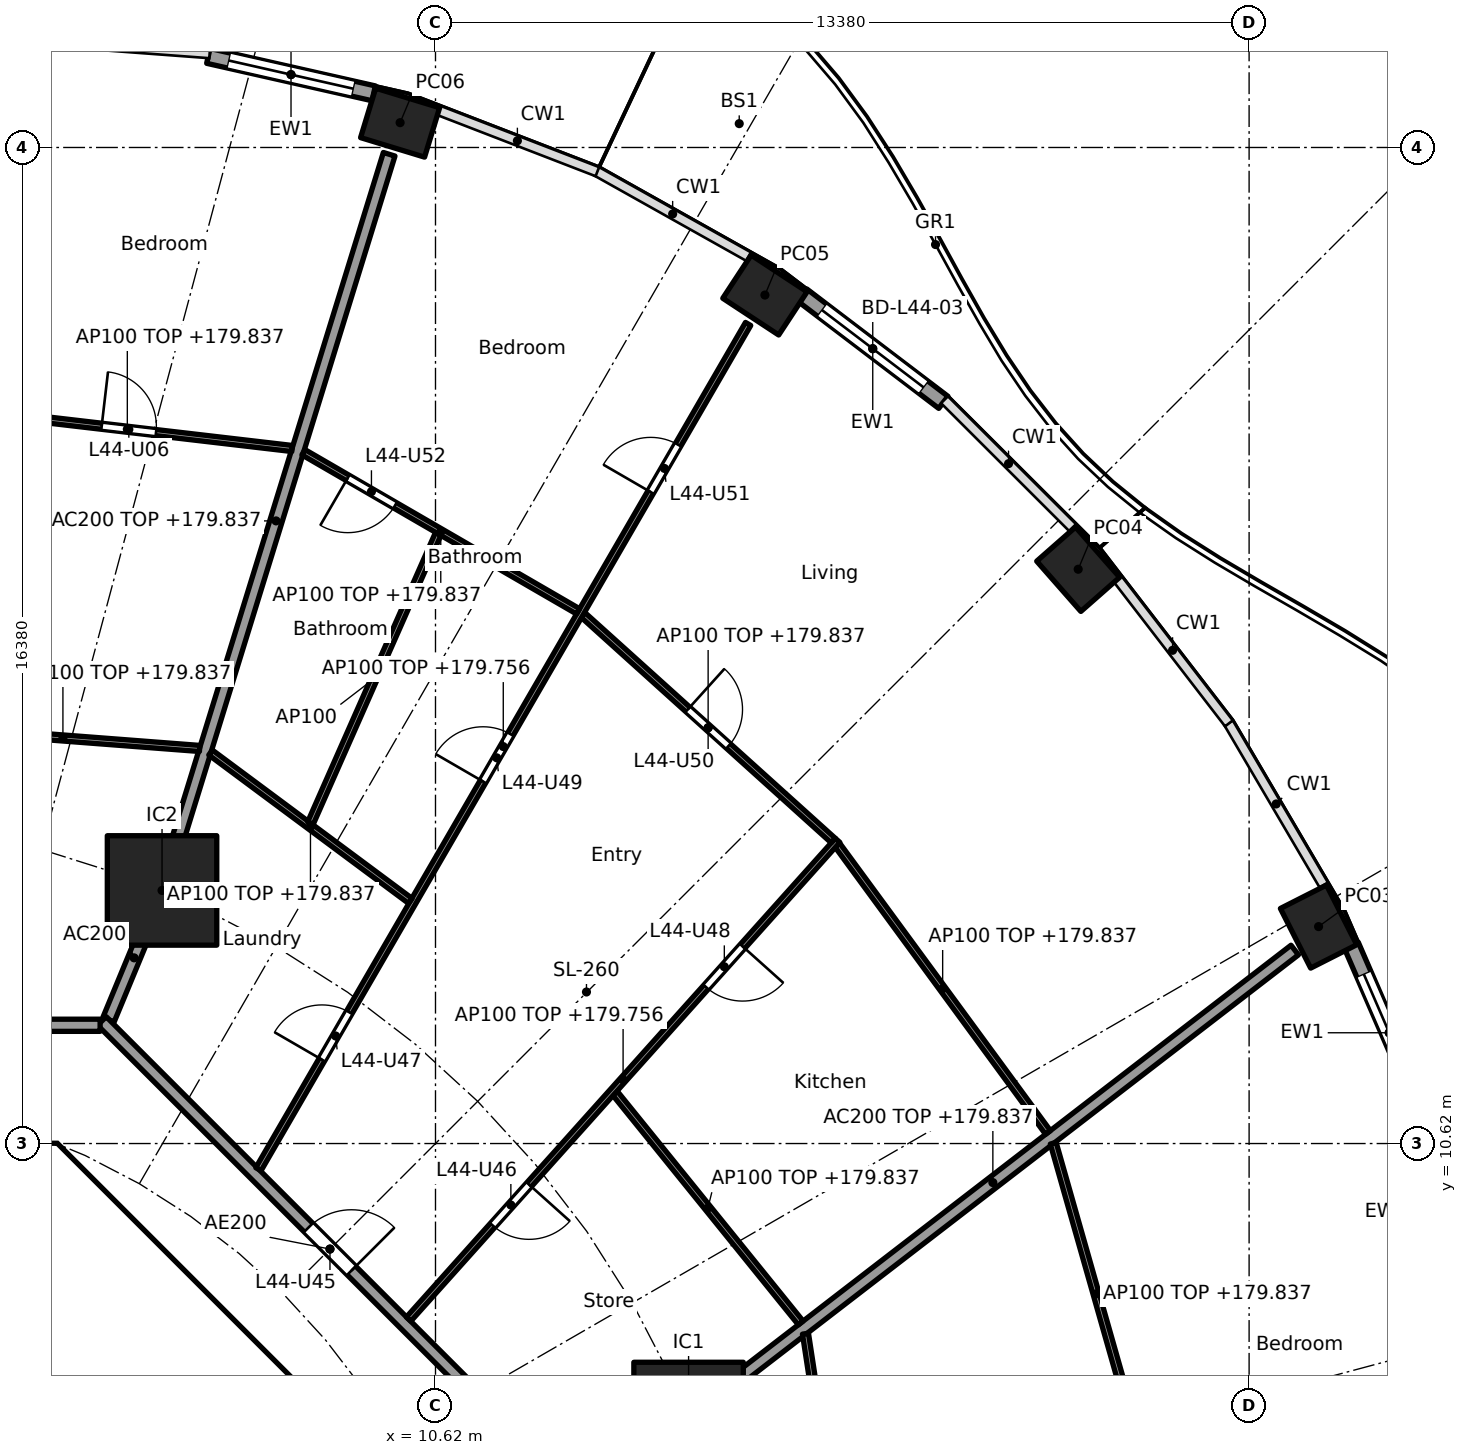
"""IFC4 building model, lengths in metres.
Left out: names, types, materials, properties, quantities, classifications, styles, units other than length and angle.
Written with IfcOpenShell. Run it as: python <this file> out.ifc"""

import sys

from ifc_helpers import new_model, si_unit, direction, frame, frame_2d, origin, origin_2d, place, context, subcontext, project, spatial, polyline, rectangle, hollow_rectangle, outline, extrude, element, fill, save


model = new_model("IFC4")
c1 = context("Model", 3, precision=1e-05, world=origin(), true_north=direction((0.0, 1.0)))
c2 = subcontext(c1, "Body", "Model", "MODEL_VIEW")
j1 = project(units=[si_unit("LENGTHUNIT", "METRE"), si_unit("PLANEANGLEUNIT", "RADIAN")], contexts=[c1])
p1 = place(None, origin())
s1 = spatial("IfcSite", under=j1, at=p1, CompositionType="ELEMENT")
p2 = place(p1, origin())
s2 = spatial("IfcBuilding", under=s1, at=p2, CompositionType="ELEMENT")
p3 = place(p2, frame((0.0, 0.0, 177.0)))
s3 = spatial("IfcBuildingStorey", under=s2, at=p3, CompositionType="ELEMENT", Elevation=177.0)
for number, where, z_axis, x_axis in (
    (1, (25.142, 14.188, 0.0), (0.0, 0.0, 1.0), (-0.452, 0.892, 0.0)),
    (2, (21.189, 20.064, 0.0), (0.0, 0.0, 1.0), (-0.66, 0.751, 0.0)),
    (3, (16.038, 24.573, 0.0), (0.0, 0.0, 1.0), (-0.836, 0.549, 0.0)),
    (4, (10.038, 27.408, 0.0), (0.0, 0.0, 1.0), (-0.957, 0.292, 0.0)),
):
    element("IfcColumn", number, at=place(p3, frame(where, z_axis=z_axis, x_axis=x_axis)), inside=s3, PredefinedType="COLUMN", context=c2, shape_type="SweptSolid", body=[
        extrude(hollow_rectangle(XDim=1.1, YDim=0.85, WallThickness=0.036, at=origin_2d()), origin(), (0.0, 0.0, 1.0), 3.7),
    ])
for number, where, z_axis, x_axis in (
    (5, (14.782, 6.123, 0.0), (0.0, 0.0, 1.0), (1.0, 0.0, 0.0)),
    (6, (6.123, 14.782, 0.0), (0.0, 0.0, 1.0), (1.0, 0.0, 0.0)),
):
    element("IfcColumn", number, at=place(p3, frame(where, z_axis=z_axis, x_axis=x_axis)), inside=s3, PredefinedType="COLUMN", context=c2, shape_type="SweptSolid", body=[
        extrude(rectangle(XDim=1.8, YDim=1.8, at=origin_2d()), origin(), (0.0, 0.0, 1.0), 3.7),
    ])
p4 = place(p3, frame((25.679, 13.883, 0.0), z_axis=(0.0, 0.0, 1.0), x_axis=(0.397620521824, -0.917549955384, 0.0)))
e7 = element("IfcWall", 7, at=p4, inside=s3, PredefinedType="SOLIDWALL", context=c2, shape_type="SweptSolid", body=[
    extrude(rectangle(XDim=3.142, YDim=0.25, at=frame_2d((1.571, 0.0))), origin(), (0.0, 0.0, 1.0), 3.44),
])
p5 = place(p4, frame((0.521, 0.0, 0.0)))
e8 = element("IfcOpeningElement", 8, at=p5, cuts=e7, PredefinedType="OPENING", context=c2, shape_type="SweptSolid", body=[
    extrude(rectangle(XDim=2.1, YDim=2.4, at=frame_2d((1.05, 1.2))), frame((0.0, 0.135, 0.0), z_axis=(0.0, -1.0, 0.0), x_axis=(1.0, 0.0, 0.0)), (0.0, 0.0, 1.0), 0.27),
])
p6 = place(p3, frame((16.65, 24.574, 0.0), z_axis=(0.0, 0.0, 1.0), x_axis=(0.796055733703, -0.60522332146, 0.0)))
e9 = element("IfcWall", 9, at=p6, inside=s3, PredefinedType="SOLIDWALL", context=c2, shape_type="SweptSolid", body=[
    extrude(rectangle(XDim=2.917, YDim=0.25, at=frame_2d((1.458, 0.0))), origin(), (0.0, 0.0, 1.0), 3.44),
])
p7 = place(p6, frame((0.408, 0.0, 0.0)))
e10 = element("IfcOpeningElement", 10, at=p7, cuts=e9, PredefinedType="OPENING", context=c2, shape_type="SweptSolid", body=[
    extrude(rectangle(XDim=2.1, YDim=2.4, at=frame_2d((1.05, 1.2))), frame((0.0, 0.135, 0.0), z_axis=(0.0, -1.0, 0.0), x_axis=(1.0, 0.0, 0.0)), (0.0, 0.0, 1.0), 0.27),
])
p8 = place(p3, frame((6.885, 28.506, 0.0), z_axis=(0.0, 0.0, 1.0), x_axis=(0.975324329911, -0.220776926974, 0.0)))
e11 = element("IfcWall", 11, at=p8, inside=s3, PredefinedType="SOLIDWALL", context=c2, shape_type="SweptSolid", body=[
    extrude(rectangle(XDim=2.788, YDim=0.25, at=frame_2d((1.394, 0.0))), origin(), (0.0, 0.0, 1.0), 3.44),
])
p9 = place(p8, frame((0.344, 0.0, 0.0)))
e12 = element("IfcOpeningElement", 12, at=p9, cuts=e11, PredefinedType="OPENING", context=c2, shape_type="SweptSolid", body=[
    extrude(rectangle(XDim=2.1, YDim=2.4, at=frame_2d((1.05, 1.2))), frame((0.0, 0.135, 0.0), z_axis=(0.0, -1.0, 0.0), x_axis=(1.0, 0.0, 0.0)), (0.0, 0.0, 1.0), 0.27),
])
p10 = place(p3, frame((9.988, 4.613, 0.0), z_axis=(0.0, 0.0, 1.0), x_axis=(-0.707106781187, 0.707106781187, 0.0)))
e13 = element("IfcWall", 13, at=p10, inside=s3, PredefinedType="SHEAR", context=c2, shape_type="SweptSolid", body=[
    extrude(rectangle(XDim=7.602, YDim=0.6, at=frame_2d((3.801, 0.0))), origin(), (0.0, 0.0, 1.0), 3.44),
])
p11 = place(p10, frame((3.201, 0.0, 0.0)))
e14 = element("IfcOpeningElement", 14, at=p11, cuts=e13, PredefinedType="OPENING", context=c2, shape_type="SweptSolid", body=[
    extrude(rectangle(XDim=1.2, YDim=2.1, at=frame_2d((0.6, 1.05))), frame((0.0, 0.31, 0.0), z_axis=(0.0, -1.0, 0.0), x_axis=(1.0, 0.0, 0.0)), (0.0, 0.0, 1.0), 0.62),
])
p12 = place(p3, origin())
e15 = element("IfcWall", 15, at=p12, inside=s3, PredefinedType="SHEAR", context=c2, shape_type="SweptSolid", body=[
    extrude(outline(polyline([(-4.152, 10.025), (-4.401, 9.776), (-4.825, 10.2), (-4.401, 10.625), (4.401, 10.625), (4.825, 10.2), (4.401, 9.776), (4.152, 10.025), (-4.152, 10.025)])), origin(), (0.0, 0.0, 1.0), 3.44),
])
p13 = place(p3, frame((14.822, 6.154, 0.0), z_axis=(0.0, 0.0, 1.0), x_axis=(0.792203056092, 0.610257583254, 0.0)))
e16 = element("IfcWall", 16, at=p13, inside=s3, PredefinedType="PARTITIONING", context=c2, shape_type="SweptSolid", body=[
    extrude(rectangle(XDim=12.533, YDim=0.2, at=frame_2d((6.266, 0.0))), origin(), (0.0, 0.0, 1.0), 2.837),
])
p14 = place(p3, frame((5.243, 12.657, 0.0), z_axis=(0.0, 0.0, 1.0), x_axis=(0.382747093259, 0.923853160736, 0.0)))
e17 = element("IfcWall", 17, at=p14, inside=s3, PredefinedType="PARTITIONING", context=c2, shape_type="SweptSolid", body=[
    extrude(rectangle(XDim=2.2, YDim=0.2, at=frame_2d((1.1, 0.0))), origin(), (0.0, 0.0, 1.0), 3.44),
])
p15 = place(p3, frame((6.138, 14.83, 0.0), z_axis=(0.0, 0.0, 1.0), x_axis=(0.294818517221, 0.955553264818, 0.0)))
e18 = element("IfcWall", 18, at=p15, inside=s3, PredefinedType="PARTITIONING", context=c2, shape_type="SweptSolid", body=[
    extrude(rectangle(XDim=12.619, YDim=0.2, at=frame_2d((6.31, 0.0))), origin(), (0.0, 0.0, 1.0), 2.837),
])
p16 = place(p3, frame((12.635, 5.134, 0.0), z_axis=(0.0, 0.0, 1.0), x_axis=(-0.707106781187, 0.707106781187, 0.0)))
e19 = element("IfcWall", 19, at=p16, inside=s3, PredefinedType="PARTITIONING", context=c2, shape_type="SweptSolid", body=[
    extrude(rectangle(XDim=10.609, YDim=0.2, at=frame_2d((5.305, 0.0))), origin(), (0.0, 0.0, 1.0), 3.44),
])
p17 = place(p16, frame((4.804, 0.0, 0.0)))
e20 = element("IfcOpeningElement", 20, at=p17, cuts=e19, PredefinedType="OPENING", context=c2, shape_type="SweptSolid", body=[
    extrude(rectangle(XDim=1.0, YDim=2.1, at=frame_2d((0.5, 1.05))), frame((0.0, 0.11, 0.0), z_axis=(0.0, -1.0, 0.0), x_axis=(1.0, 0.0, 0.0)), (0.0, 0.0, 1.0), 0.22),
])
p18 = place(p3, frame((5.104, 12.565, 0.0), z_axis=(0.0, 0.0, 1.0), x_axis=(-1.0, 0.0, 0.0)))
e21 = element("IfcWall", 21, at=p18, inside=s3, PredefinedType="PARTITIONING", context=c2, shape_type="SweptSolid", body=[
    extrude(rectangle(XDim=10.409, YDim=0.2, at=frame_2d((5.205, 0.0))), origin(), (0.0, 0.0, 1.0), 3.44),
])
p19 = place(p18, frame((6.339, 0.0, 0.0)))
e22 = element("IfcOpeningElement", 22, at=p19, cuts=e21, PredefinedType="OPENING", context=c2, shape_type="SweptSolid", body=[
    extrude(rectangle(XDim=1.0, YDim=2.1, at=frame_2d((0.5, 1.05))), frame((0.0, 0.11, 0.0), z_axis=(0.0, -1.0, 0.0), x_axis=(1.0, 0.0, 0.0)), (0.0, 0.0, 1.0), 0.22),
])
p20 = place(p3, frame((17.221, 4.113, 0.0), z_axis=(0.0, 0.0, 1.0), x_axis=(-0.1510806336, 0.988521442434, 0.0)))
e23 = element("IfcWall", 23, at=p20, inside=s3, PredefinedType="PARTITIONING", context=c2, shape_type="SweptSolid", body=[
    extrude(rectangle(XDim=3.419, YDim=0.1, at=frame_2d((1.71, 0.0))), origin(), (0.0, 0.0, 1.0), 2.837),
])
p21 = place(p3, frame((22.189, 5.67, 0.0), z_axis=(0.0, 0.0, 1.0), x_axis=(-0.273819702124, 0.961781040949, 0.0)))
e24 = element("IfcWall", 24, at=p21, inside=s3, PredefinedType="PARTITIONING", context=c2, shape_type="SweptSolid", body=[
    extrude(rectangle(XDim=5.152, YDim=0.1, at=frame_2d((2.576, 0.0))), origin(), (0.0, 0.0, 1.0), 2.837),
])
p22 = place(p3, frame((16.626, 7.67, 0.0), z_axis=(0.0, 0.0, 1.0), x_axis=(-0.628738316533, 0.777616955399, 0.0)))
e25 = element("IfcWall", 25, at=p22, inside=s3, PredefinedType="PARTITIONING", context=c2, shape_type="SweptSolid", body=[
    extrude(rectangle(XDim=4.857, YDim=0.1, at=frame_2d((2.429, 0.0))), origin(), (0.0, 0.0, 1.0), 2.837),
])
p23 = place(p3, frame((20.692, 10.802, 0.0), z_axis=(0.0, 0.0, 1.0), x_axis=(-0.591110768293, 0.806590391468, 0.0)))
e26 = element("IfcWall", 26, at=p23, inside=s3, PredefinedType="PARTITIONING", context=c2, shape_type="SweptSolid", body=[
    extrude(rectangle(XDim=5.86, YDim=0.1, at=frame_2d((2.93, 0.0))), origin(), (0.0, 0.0, 1.0), 2.837),
])
p24 = place(p3, frame((10.178, 7.732, 0.0), z_axis=(0.0, 0.0, 1.0), x_axis=(0.667280084362, 0.744806880348, 0.0)))
e27 = element("IfcWall", 27, at=p24, inside=s3, PredefinedType="PARTITIONING", context=c2, shape_type="SweptSolid", body=[
    extrude(rectangle(XDim=10.572, YDim=0.1, at=frame_2d((5.286, 0.0))), origin(), (0.0, 0.0, 1.0), 2.756),
])
p25 = place(p24, frame((2.07, 0.0, 0.0)))
e28 = element("IfcOpeningElement", 28, at=p25, cuts=e27, PredefinedType="OPENING", context=c2, shape_type="SweptSolid", body=[
    extrude(rectangle(XDim=0.9, YDim=2.1, at=frame_2d((0.45, 1.05))), frame((0.0, 0.06, 0.0), z_axis=(0.0, -1.0, 0.0), x_axis=(1.0, 0.0, 0.0)), (0.0, 0.0, 1.0), 0.12),
])
p26 = place(p24, frame((7.331, 0.0, 0.0)))
e29 = element("IfcOpeningElement", 29, at=p26, cuts=e27, PredefinedType="OPENING", context=c2, shape_type="SweptSolid", body=[
    extrude(rectangle(XDim=0.9, YDim=2.1, at=frame_2d((0.45, 1.05))), frame((0.0, 0.06, 0.0), z_axis=(0.0, -1.0, 0.0), x_axis=(1.0, 0.0, 0.0)), (0.0, 0.0, 1.0), 0.12),
])
p27 = place(p3, frame((17.162, 15.603, 0.0), z_axis=(0.0, 0.0, 1.0), x_axis=(-0.742790086539, 0.66952437397, 0.0)))
e30 = element("IfcWall", 30, at=p27, inside=s3, PredefinedType="PARTITIONING", context=c2, shape_type="SweptSolid", body=[
    extrude(rectangle(XDim=5.542, YDim=0.1, at=frame_2d((2.771, 0.0))), origin(), (0.0, 0.0, 1.0), 2.837),
])
p28 = place(p27, frame((2.321, 0.0, 0.0)))
e31 = element("IfcOpeningElement", 31, at=p28, cuts=e30, PredefinedType="OPENING", context=c2, shape_type="SweptSolid", body=[
    extrude(rectangle(XDim=0.9, YDim=2.1, at=frame_2d((0.45, 1.05))), frame((0.0, 0.06, 0.0), z_axis=(0.0, -1.0, 0.0), x_axis=(1.0, 0.0, 0.0)), (0.0, 0.0, 1.0), 0.12),
])
p29 = place(p3, frame((7.708, 10.198, 0.0), z_axis=(0.0, 0.0, 1.0), x_axis=(0.501305229744, 0.865270516446, 0.0)))
e32 = element("IfcWall", 32, at=p29, inside=s3, PredefinedType="PARTITIONING", context=c2, shape_type="SweptSolid", body=[
    extrude(rectangle(XDim=16.064, YDim=0.1, at=frame_2d((8.032, 0.0))), origin(), (0.0, 0.0, 1.0), 2.756),
])
p30 = place(p29, frame((2.082, 0.0, 0.0)))
e33 = element("IfcOpeningElement", 33, at=p30, cuts=e32, PredefinedType="OPENING", context=c2, shape_type="SweptSolid", body=[
    extrude(rectangle(XDim=0.9, YDim=2.1, at=frame_2d((0.45, 1.05))), frame((0.0, 0.06, 0.0), z_axis=(0.0, -1.0, 0.0), x_axis=(1.0, 0.0, 0.0)), (0.0, 0.0, 1.0), 0.12),
])
p31 = place(p29, frame((7.369, 0.0, 0.0)))
e34 = element("IfcOpeningElement", 34, at=p31, cuts=e32, PredefinedType="OPENING", context=c2, shape_type="SweptSolid", body=[
    extrude(rectangle(XDim=0.9, YDim=2.1, at=frame_2d((0.45, 1.05))), frame((0.0, 0.06, 0.0), z_axis=(0.0, -1.0, 0.0), x_axis=(1.0, 0.0, 0.0)), (0.0, 0.0, 1.0), 0.12),
])
p32 = place(p29, frame((12.869, 0.0, 0.0)))
e35 = element("IfcOpeningElement", 35, at=p32, cuts=e32, PredefinedType="OPENING", context=c2, shape_type="SweptSolid", body=[
    extrude(rectangle(XDim=0.9, YDim=2.1, at=frame_2d((0.45, 1.05))), frame((0.0, 0.06, 0.0), z_axis=(0.0, -1.0, 0.0), x_axis=(1.0, 0.0, 0.0)), (0.0, 0.0, 1.0), 0.12),
])
p33 = place(p3, frame((10.207, 14.61, 0.0), z_axis=(0.0, 0.0, 1.0), x_axis=(-0.802769141821, 0.596289950394, 0.0)))
e36 = element("IfcWall", 36, at=p33, inside=s3, PredefinedType="PARTITIONING", context=c2, shape_type="SweptSolid", body=[
    extrude(rectangle(XDim=4.092, YDim=0.1, at=frame_2d((2.046, 0.0))), origin(), (0.0, 0.0, 1.0), 2.837),
])
p34 = place(p3, frame((12.965, 19.371, 0.0), z_axis=(0.0, 0.0, 1.0), x_axis=(-0.865286427811, 0.501277765163, 0.0)))
e37 = element("IfcWall", 37, at=p34, inside=s3, PredefinedType="PARTITIONING", context=c2, shape_type="SweptSolid", body=[
    extrude(rectangle(XDim=5.22, YDim=0.1, at=frame_2d((2.61, 0.0))), origin(), (0.0, 0.0, 1.0), 2.837),
])
p35 = place(p34, frame((3.478, 0.0, 0.0)))
e38 = element("IfcOpeningElement", 38, at=p35, cuts=e37, PredefinedType="OPENING", context=c2, shape_type="SweptSolid", body=[
    extrude(rectangle(XDim=0.9, YDim=2.1, at=frame_2d((0.45, 1.05))), frame((0.0, 0.06, 0.0), z_axis=(0.0, -1.0, 0.0), x_axis=(1.0, 0.0, 0.0)), (0.0, 0.0, 1.0), 0.12),
])
p36 = place(p3, frame((8.564, 15.89, 0.0), z_axis=(0.0, 0.0, 1.0), x_axis=(0.404011266873, 0.914754008595, 0.0)))
e39 = element("IfcWall", 39, at=p36, inside=s3, PredefinedType="PARTITIONING", context=c2, shape_type="SweptSolid", body=[
    extrude(rectangle(XDim=5.199, YDim=0.1, at=frame_2d((2.6, 0.0))), origin(), (0.0, 0.0, 1.0), 3.44),
])
p37 = place(p3, frame((6.741, 17.117, 0.0), z_axis=(0.0, 0.0, 1.0), x_axis=(-0.997078320723, 0.076386008825, 0.0)))
e40 = element("IfcWall", 40, at=p37, inside=s3, PredefinedType="PARTITIONING", context=c2, shape_type="SweptSolid", body=[
    extrude(rectangle(XDim=4.51, YDim=0.1, at=frame_2d((2.255, 0.0))), origin(), (0.0, 0.0, 1.0), 2.837),
])
p38 = place(p3, frame((8.262, 22.05, 0.0), z_axis=(0.0, 0.0, 1.0), x_axis=(-0.993250089265, 0.115992500516, 0.0)))
e41 = element("IfcWall", 41, at=p38, inside=s3, PredefinedType="PARTITIONING", context=c2, shape_type="SweptSolid", body=[
    extrude(rectangle(XDim=5.458, YDim=0.1, at=frame_2d((2.729, 0.0))), origin(), (0.0, 0.0, 1.0), 2.837),
])
p39 = place(p38, frame((2.254, 0.0, 0.0)))
e42 = element("IfcOpeningElement", 42, at=p39, cuts=e41, PredefinedType="OPENING", context=c2, shape_type="SweptSolid", body=[
    extrude(rectangle(XDim=0.9, YDim=2.1, at=frame_2d((0.45, 1.05))), frame((0.0, 0.06, 0.0), z_axis=(0.0, -1.0, 0.0), x_axis=(1.0, 0.0, 0.0)), (0.0, 0.0, 1.0), 0.12),
])
p40 = place(p5, origin())
e43 = element("IfcDoor", 43, at=p40, inside=s3, OperationType="SLIDING_TO_LEFT", PredefinedType="DOOR", context=c2, shape_type="SweptSolid", body=[
    extrude(rectangle(XDim=2.1, YDim=2.4, at=frame_2d((1.05, 1.2))), frame((0.0, 0.025, 0.0), z_axis=(0.0, -1.0, 0.0), x_axis=(1.0, 0.0, 0.0)), (0.0, 0.0, 1.0), 0.05),
])
fill(e8, e43)
p41 = place(p7, origin())
e44 = element("IfcDoor", 44, at=p41, inside=s3, OperationType="SLIDING_TO_LEFT", PredefinedType="DOOR", context=c2, shape_type="SweptSolid", body=[
    extrude(rectangle(XDim=2.1, YDim=2.4, at=frame_2d((1.05, 1.2))), frame((0.0, 0.025, 0.0), z_axis=(0.0, -1.0, 0.0), x_axis=(1.0, 0.0, 0.0)), (0.0, 0.0, 1.0), 0.05),
])
fill(e10, e44)
p42 = place(p9, origin())
e45 = element("IfcDoor", 45, at=p42, inside=s3, OperationType="SLIDING_TO_LEFT", PredefinedType="DOOR", context=c2, shape_type="SweptSolid", body=[
    extrude(rectangle(XDim=2.1, YDim=2.4, at=frame_2d((1.05, 1.2))), frame((0.0, 0.025, 0.0), z_axis=(0.0, -1.0, 0.0), x_axis=(1.0, 0.0, 0.0)), (0.0, 0.0, 1.0), 0.05),
])
fill(e12, e45)
p43 = place(p11, origin())
e46 = element("IfcDoor", 46, at=p43, inside=s3, OperationType="SINGLE_SWING_LEFT", PredefinedType="DOOR", context=c2, shape_type="SweptSolid", body=[
    extrude(rectangle(XDim=1.2, YDim=2.1, at=frame_2d((0.6, 1.05))), frame((0.0, 0.025, 0.0), z_axis=(0.0, -1.0, 0.0), x_axis=(1.0, 0.0, 0.0)), (0.0, 0.0, 1.0), 0.05),
])
fill(e14, e46)
p44 = place(p39, frame((0.9, 0.0, 0.0), x_axis=(-1.0, 0.0, 0.0)))
e47 = element("IfcDoor", 47, at=p44, inside=s3, OperationType="SINGLE_SWING_LEFT", PredefinedType="DOOR", context=c2, shape_type="SweptSolid", body=[
    extrude(rectangle(XDim=0.9, YDim=2.1, at=frame_2d((0.45, 1.05))), frame((0.0, 0.025, 0.0), z_axis=(0.0, -1.0, 0.0), x_axis=(1.0, 0.0, 0.0)), (0.0, 0.0, 1.0), 0.05),
])
fill(e42, e47)
p45 = place(p17, frame((1.0, 0.0, 0.0), x_axis=(-1.0, 0.0, 0.0)))
e48 = element("IfcDoor", 48, at=p45, inside=s3, OperationType="SINGLE_SWING_RIGHT", PredefinedType="DOOR", context=c2, shape_type="SweptSolid", body=[
    extrude(rectangle(XDim=1.0, YDim=2.1, at=frame_2d((0.5, 1.05))), frame((0.0, 0.025, 0.0), z_axis=(0.0, -1.0, 0.0), x_axis=(1.0, 0.0, 0.0)), (0.0, 0.0, 1.0), 0.05),
])
fill(e20, e48)
p46 = place(p25, frame((0.9, 0.0, 0.0), x_axis=(-1.0, 0.0, 0.0)))
e49 = element("IfcDoor", 49, at=p46, inside=s3, OperationType="SINGLE_SWING_LEFT", PredefinedType="DOOR", context=c2, shape_type="SweptSolid", body=[
    extrude(rectangle(XDim=0.9, YDim=2.1, at=frame_2d((0.45, 1.05))), frame((0.0, 0.025, 0.0), z_axis=(0.0, -1.0, 0.0), x_axis=(1.0, 0.0, 0.0)), (0.0, 0.0, 1.0), 0.05),
])
fill(e28, e49)
p47 = place(p30, origin())
e50 = element("IfcDoor", 50, at=p47, inside=s3, OperationType="SINGLE_SWING_LEFT", PredefinedType="DOOR", context=c2, shape_type="SweptSolid", body=[
    extrude(rectangle(XDim=0.9, YDim=2.1, at=frame_2d((0.45, 1.05))), frame((0.0, 0.025, 0.0), z_axis=(0.0, -1.0, 0.0), x_axis=(1.0, 0.0, 0.0)), (0.0, 0.0, 1.0), 0.05),
])
fill(e33, e50)
p48 = place(p26, frame((0.9, 0.0, 0.0), x_axis=(-1.0, 0.0, 0.0)))
e51 = element("IfcDoor", 51, at=p48, inside=s3, OperationType="SINGLE_SWING_LEFT", PredefinedType="DOOR", context=c2, shape_type="SweptSolid", body=[
    extrude(rectangle(XDim=0.9, YDim=2.1, at=frame_2d((0.45, 1.05))), frame((0.0, 0.025, 0.0), z_axis=(0.0, -1.0, 0.0), x_axis=(1.0, 0.0, 0.0)), (0.0, 0.0, 1.0), 0.05),
])
fill(e29, e51)
p49 = place(p31, origin())
e52 = element("IfcDoor", 52, at=p49, inside=s3, OperationType="SINGLE_SWING_LEFT", PredefinedType="DOOR", context=c2, shape_type="SweptSolid", body=[
    extrude(rectangle(XDim=0.9, YDim=2.1, at=frame_2d((0.45, 1.05))), frame((0.0, 0.025, 0.0), z_axis=(0.0, -1.0, 0.0), x_axis=(1.0, 0.0, 0.0)), (0.0, 0.0, 1.0), 0.05),
])
fill(e34, e52)
p50 = place(p28, frame((0.9, 0.0, 0.0), x_axis=(-1.0, 0.0, 0.0)))
e53 = element("IfcDoor", 53, at=p50, inside=s3, OperationType="SINGLE_SWING_LEFT", PredefinedType="DOOR", context=c2, shape_type="SweptSolid", body=[
    extrude(rectangle(XDim=0.9, YDim=2.1, at=frame_2d((0.45, 1.05))), frame((0.0, 0.025, 0.0), z_axis=(0.0, -1.0, 0.0), x_axis=(1.0, 0.0, 0.0)), (0.0, 0.0, 1.0), 0.05),
])
fill(e31, e53)
p51 = place(p32, origin())
e54 = element("IfcDoor", 54, at=p51, inside=s3, OperationType="SINGLE_SWING_LEFT", PredefinedType="DOOR", context=c2, shape_type="SweptSolid", body=[
    extrude(rectangle(XDim=0.9, YDim=2.1, at=frame_2d((0.45, 1.05))), frame((0.0, 0.025, 0.0), z_axis=(0.0, -1.0, 0.0), x_axis=(1.0, 0.0, 0.0)), (0.0, 0.0, 1.0), 0.05),
])
fill(e35, e54)
p52 = place(p35, origin())
e55 = element("IfcDoor", 55, at=p52, inside=s3, OperationType="SINGLE_SWING_RIGHT", PredefinedType="DOOR", context=c2, shape_type="SweptSolid", body=[
    extrude(rectangle(XDim=0.9, YDim=2.1, at=frame_2d((0.45, 1.05))), frame((0.0, 0.025, 0.0), z_axis=(0.0, -1.0, 0.0), x_axis=(1.0, 0.0, 0.0)), (0.0, 0.0, 1.0), 0.05),
])
fill(e38, e55)
save(model, sys.argv[1])
